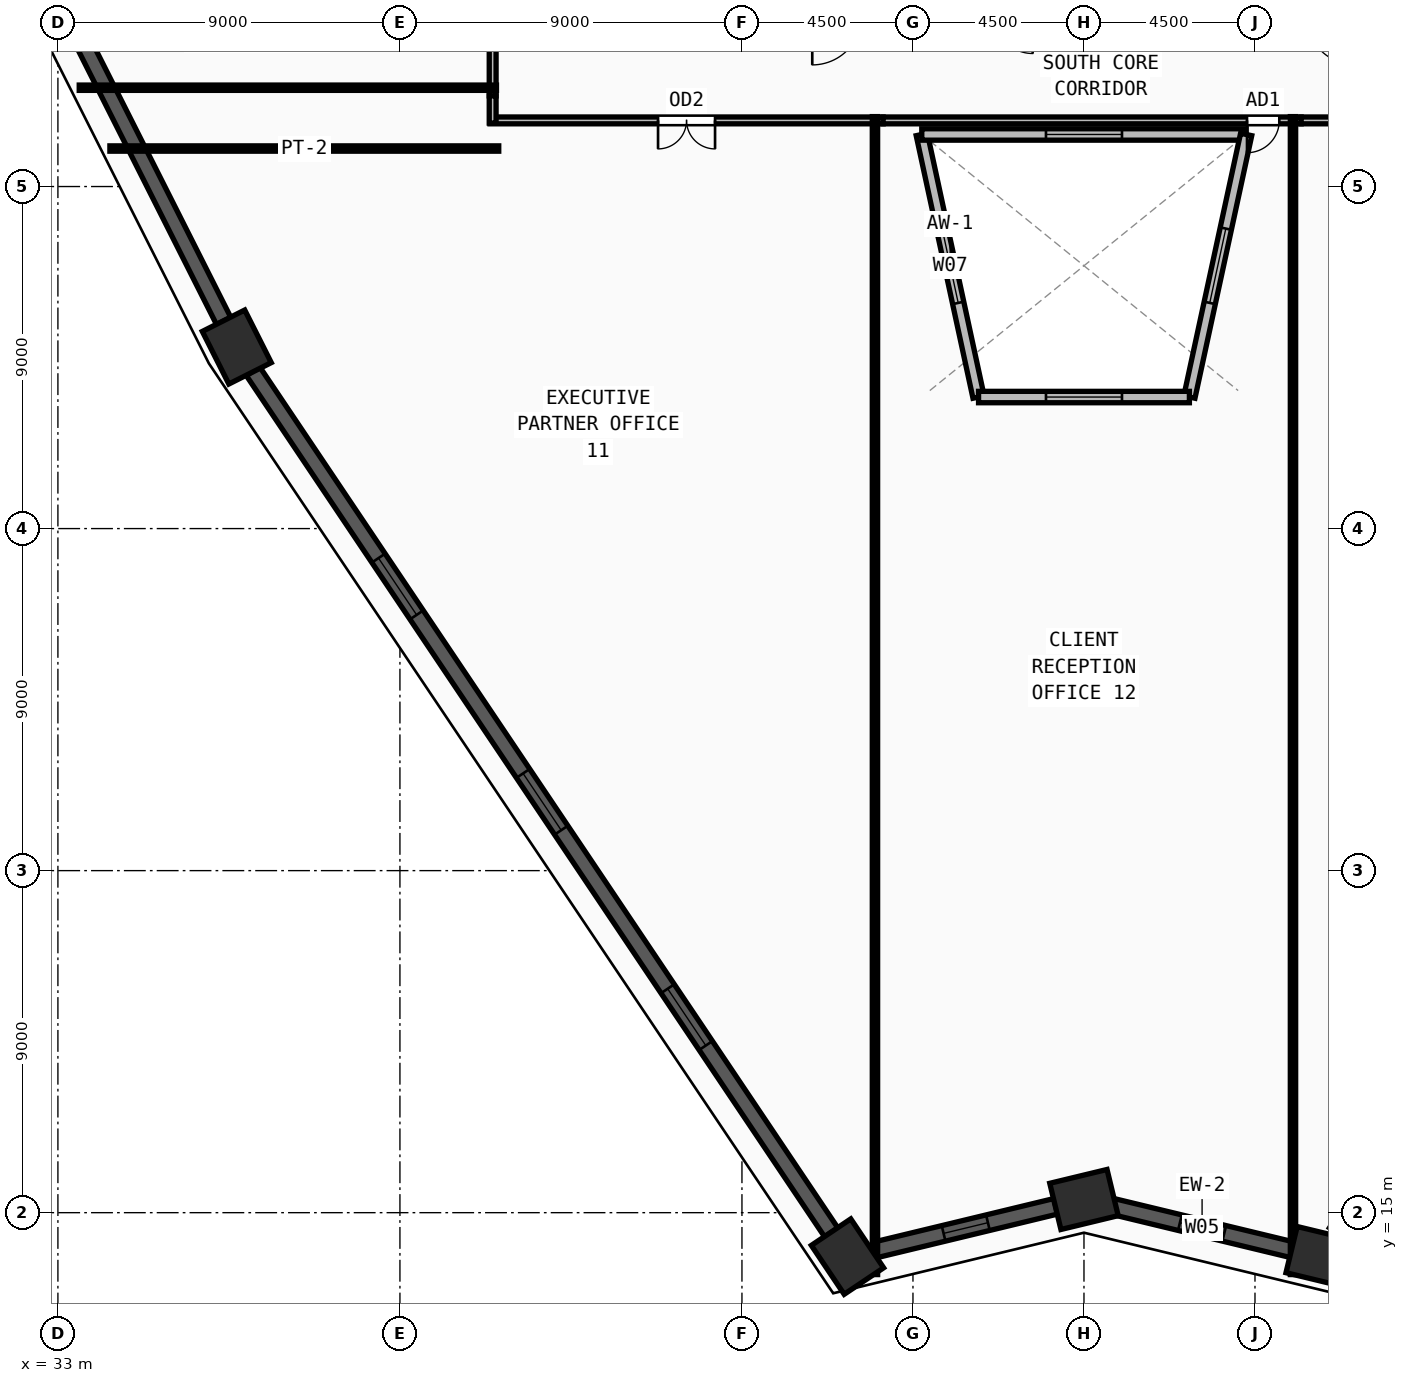
"""IFC4 building model, lengths in metres.
Left out: names, types, materials, properties, quantities, classifications, styles, units other than length and angle.
Written with IfcOpenShell. Run it as: python <this file> out.ifc"""

import sys

from ifc_helpers import new_model, si_unit, direction, frame, frame_2d, origin, origin_2d, place, context, subcontext, project, spatial, rectangle, extrude, source, transform, mapped, element, fill, save


model = new_model("IFC4")
c1 = context("Model", 3, precision=1e-05, world=origin(), true_north=direction((0.0, 1.0)))
c2 = subcontext(c1, "Body", "Model", "MODEL_VIEW")
j1 = project(units=[si_unit("LENGTHUNIT", "METRE"), si_unit("PLANEANGLEUNIT", "RADIAN")], contexts=[c1])
p1 = place(None, origin())
s1 = spatial("IfcSite", under=j1, at=p1, CompositionType="ELEMENT")
p2 = place(p1, origin())
s2 = spatial("IfcBuilding", under=s1, at=p2, CompositionType="ELEMENT")
p3 = place(p2, frame((0.0, 0.0, 74.25)))
s3 = spatial("IfcBuildingStorey", under=s2, at=p3, CompositionType="ELEMENT", Elevation=74.25)
m1 = source(origin(), c2, "Body", "SweptSolid", [
    extrude(rectangle(XDim=1.55, YDim=1.25, at=origin_2d()), origin(), (0.0, 0.0, 1.0), 3.75),
])
for number, where, z_axis, x_axis in (
    (1, (53.777, 13.844, 0.0), (0.0, 0.0, 1.0), (-0.557, 0.83, 0.0)),
    (2, (37.707, 37.777, 0.0), (0.0, 0.0, 1.0), (-0.45, 0.893, 0.0)),
    (3, (66.216, 13.846, 0.0), (0.0, 0.0, 1.0), (-0.972, 0.235, 0.0)),
    (4, (60.0, 15.347, 0.0), (0.0, 0.0, 1.0), (0.972, 0.235, 0.0)),
):
    element("IfcColumn", number, at=place(p3, frame(where, z_axis=z_axis, x_axis=x_axis)), inside=s3, PredefinedType="COLUMN", context=c2, shape_type="MappedRepresentation", body=[
        mapped(m1, transform((0.0, 0.0, 0.0), x_axis=(1.0, 0.0, 0.0), y_axis=(0.0, 1.0, 0.0), z_axis=(0.0, 0.0, 1.0), scale=1.0)),
    ])
p4 = place(p3, frame((60.744, 15.167, 0.0), z_axis=(0.0, 0.0, 1.0), x_axis=(0.972088524974, -0.234614363613, 0.0)))
e5 = element("IfcWall", 5, at=p4, inside=s3, PredefinedType="SOLIDWALL", context=c2, shape_type="SweptSolid", body=[
    extrude(rectangle(XDim=4.864, YDim=0.42, at=frame_2d((2.432, 0.0))), origin(), (0.0, 0.0, 1.0), 3.57),
])
m2 = source(origin(), c2, "Body", "SweptSolid", [
    extrude(rectangle(XDim=1.2, YDim=1.9, at=frame_2d((0.6, 0.95))), frame((0.0, 0.22, 0.0), z_axis=(0.0, -1.0, 0.0), x_axis=(1.0, 0.0, 0.0)), (0.0, 0.0, 1.0), 0.44),
])
p5 = place(p4, frame((1.832, 0.0, 0.55)))
e6 = element("IfcOpeningElement", 6, at=p5, cuts=e5, PredefinedType="OPENING", context=c2, shape_type="MappedRepresentation", body=[
    mapped(m2, transform((0.0, 0.0, 0.0), x_axis=(1.0, 0.0, 0.0), y_axis=(0.0, 1.0, 0.0), z_axis=(0.0, 0.0, 1.0), scale=1.0)),
])
p6 = place(p3, frame((22.462, 68.01, 0.0), z_axis=(0.0, 0.0, 1.0), x_axis=(0.450259201953, -0.89289789509, 0.0)))
e7 = element("IfcWall", 7, at=p6, inside=s3, PredefinedType="SOLIDWALL", context=c2, shape_type="SweptSolid", body=[
    extrude(rectangle(XDim=33.094, YDim=0.42, at=frame_2d((16.547, 0.0))), origin(), (0.0, 0.0, 1.0), 3.57),
])
m3 = source(origin(), c2, "Body", "SweptSolid", [
    extrude(rectangle(XDim=1.8, YDim=1.95, at=frame_2d((0.9, 0.975))), frame((0.0, 0.22, 0.0), z_axis=(0.0, -1.0, 0.0), x_axis=(1.0, 0.0, 0.0)), (0.0, 0.0, 1.0), 0.44),
])
p7 = place(p6, frame((7.374, 0.0, 0.55)))
e8 = element("IfcOpeningElement", 8, at=p7, cuts=e7, PredefinedType="OPENING", context=c2, shape_type="MappedRepresentation", body=[
    mapped(m3, transform((0.0, 0.0, 0.0), x_axis=(1.0, 0.0, 0.0), y_axis=(0.0, 1.0, 0.0), z_axis=(0.0, 0.0, 1.0), scale=1.0)),
])
p8 = place(p6, frame((17.197, 0.0, 0.55)))
e9 = element("IfcOpeningElement", 9, at=p8, cuts=e7, PredefinedType="OPENING", context=c2, shape_type="MappedRepresentation", body=[
    mapped(m3, transform((0.0, 0.0, 0.0), x_axis=(1.0, 0.0, 0.0), y_axis=(0.0, 1.0, 0.0), z_axis=(0.0, 0.0, 1.0), scale=1.0)),
])
p9 = place(p6, frame((23.071, 0.0, 0.55)))
e10 = element("IfcOpeningElement", 10, at=p9, cuts=e7, PredefinedType="OPENING", context=c2, shape_type="MappedRepresentation", body=[
    mapped(m3, transform((0.0, 0.0, 0.0), x_axis=(1.0, 0.0, 0.0), y_axis=(0.0, 1.0, 0.0), z_axis=(0.0, 0.0, 1.0), scale=1.0)),
])
p10 = place(p3, frame((38.133, 37.142, 0.0), z_axis=(0.0, 0.0, 1.0), x_axis=(0.557468884112, -0.830197833801, 0.0)))
e11 = element("IfcWall", 11, at=p10, inside=s3, PredefinedType="SOLIDWALL", context=c2, shape_type="SweptSolid", body=[
    extrude(rectangle(XDim=27.298, YDim=0.42, at=frame_2d((13.649, 0.0))), origin(), (0.0, 0.0, 1.0), 3.57),
])
p11 = place(p10, frame((5.925, 0.0, 0.55)))
e12 = element("IfcOpeningElement", 12, at=p11, cuts=e11, PredefinedType="OPENING", context=c2, shape_type="MappedRepresentation", body=[
    mapped(m3, transform((0.0, 0.0, 0.0), x_axis=(1.0, 0.0, 0.0), y_axis=(0.0, 1.0, 0.0), z_axis=(0.0, 0.0, 1.0), scale=1.0)),
])
p12 = place(p10, frame((12.749, 0.0, 0.55)))
e13 = element("IfcOpeningElement", 13, at=p12, cuts=e11, PredefinedType="OPENING", context=c2, shape_type="MappedRepresentation", body=[
    mapped(m3, transform((0.0, 0.0, 0.0), x_axis=(1.0, 0.0, 0.0), y_axis=(0.0, 1.0, 0.0), z_axis=(0.0, 0.0, 1.0), scale=1.0)),
])
p13 = place(p10, frame((19.574, 0.0, 0.55)))
e14 = element("IfcOpeningElement", 14, at=p13, cuts=e11, PredefinedType="OPENING", context=c2, shape_type="MappedRepresentation", body=[
    mapped(m3, transform((0.0, 0.0, 0.0), x_axis=(1.0, 0.0, 0.0), y_axis=(0.0, 1.0, 0.0), z_axis=(0.0, 0.0, 1.0), scale=1.0)),
])
p14 = place(p3, frame((54.521, 14.024, 0.0), z_axis=(0.0, 0.0, 1.0), x_axis=(0.972077083714, 0.234661763648, 0.0)))
e15 = element("IfcWall", 15, at=p14, inside=s3, PredefinedType="SOLIDWALL", context=c2, shape_type="SweptSolid", body=[
    extrude(rectangle(XDim=4.871, YDim=0.42, at=frame_2d((2.436, 0.0))), origin(), (0.0, 0.0, 1.0), 3.57),
])
p15 = place(p14, frame((1.836, 0.0, 0.55)))
e16 = element("IfcOpeningElement", 16, at=p15, cuts=e15, PredefinedType="OPENING", context=c2, shape_type="MappedRepresentation", body=[
    mapped(m2, transform((0.0, 0.0, 0.0), x_axis=(1.0, 0.0, 0.0), y_axis=(0.0, 1.0, 0.0), z_axis=(0.0, 0.0, 1.0), scale=1.0)),
])
p16 = place(p3, frame((57.226, 36.461, 0.0), z_axis=(0.0, 0.0, 1.0), x_axis=(-0.211368462484, 0.977406452336, 0.0)))
e17 = element("IfcWall", 17, at=p16, inside=s3, PredefinedType="SOLIDWALL", context=c2, shape_type="SweptSolid", body=[
    extrude(rectangle(XDim=7.069, YDim=0.3, at=frame_2d((3.534, 0.0))), origin(), (0.0, 0.0, 1.0), 3.57),
])
m4 = source(origin(), c2, "Body", "SweptSolid", [
    extrude(rectangle(XDim=2.0, YDim=1.9, at=frame_2d((1.0, 0.95))), frame((0.0, 0.16, 0.0), z_axis=(0.0, -1.0, 0.0), x_axis=(1.0, 0.0, 0.0)), (0.0, 0.0, 1.0), 0.32),
])
p17 = place(p16, frame((2.534, 0.0, 0.55)))
e18 = element("IfcOpeningElement", 18, at=p17, cuts=e17, PredefinedType="OPENING", context=c2, shape_type="MappedRepresentation", body=[
    mapped(m4, transform((0.0, 0.0, 0.0), x_axis=(1.0, 0.0, 0.0), y_axis=(0.0, 1.0, 0.0), z_axis=(0.0, 0.0, 1.0), scale=1.0)),
])
p18 = place(p3, frame((55.732, 43.37, 0.0), z_axis=(0.0, 0.0, 1.0), x_axis=(1.0, 0.0, 0.0)))
e19 = element("IfcWall", 19, at=p18, inside=s3, PredefinedType="SOLIDWALL", context=c2, shape_type="SweptSolid", body=[
    extrude(rectangle(XDim=8.536, YDim=0.3, at=frame_2d((4.268, 0.0))), origin(), (0.0, 0.0, 1.0), 3.57),
])
p19 = place(p18, frame((3.268, 0.0, 0.55)))
e20 = element("IfcOpeningElement", 20, at=p19, cuts=e19, PredefinedType="OPENING", context=c2, shape_type="MappedRepresentation", body=[
    mapped(m4, transform((0.0, 0.0, 0.0), x_axis=(1.0, 0.0, 0.0), y_axis=(0.0, 1.0, 0.0), z_axis=(0.0, 0.0, 1.0), scale=1.0)),
])
p20 = place(p3, frame((64.268, 43.37, 0.0), z_axis=(0.0, 0.0, 1.0), x_axis=(-0.211368462484, -0.977406452336, 0.0)))
e21 = element("IfcWall", 21, at=p20, inside=s3, PredefinedType="SOLIDWALL", context=c2, shape_type="SweptSolid", body=[
    extrude(rectangle(XDim=7.069, YDim=0.3, at=frame_2d((3.534, 0.0))), origin(), (0.0, 0.0, 1.0), 3.57),
])
p21 = place(p20, frame((2.534, 0.0, 0.55)))
e22 = element("IfcOpeningElement", 22, at=p21, cuts=e21, PredefinedType="OPENING", context=c2, shape_type="MappedRepresentation", body=[
    mapped(m4, transform((0.0, 0.0, 0.0), x_axis=(1.0, 0.0, 0.0), y_axis=(0.0, 1.0, 0.0), z_axis=(0.0, 0.0, 1.0), scale=1.0)),
])
p22 = place(p3, frame((62.774, 36.461, 0.0), z_axis=(0.0, 0.0, 1.0), x_axis=(-1.0, 0.0, 0.0)))
e23 = element("IfcWall", 23, at=p22, inside=s3, PredefinedType="SOLIDWALL", context=c2, shape_type="SweptSolid", body=[
    extrude(rectangle(XDim=5.548, YDim=0.3, at=frame_2d((2.774, 0.0))), origin(), (0.0, 0.0, 1.0), 3.57),
])
p23 = place(p22, frame((1.774, 0.0, 0.55)))
e24 = element("IfcOpeningElement", 24, at=p23, cuts=e23, PredefinedType="OPENING", context=c2, shape_type="MappedRepresentation", body=[
    mapped(m4, transform((0.0, 0.0, 0.0), x_axis=(1.0, 0.0, 0.0), y_axis=(0.0, 1.0, 0.0), z_axis=(0.0, 0.0, 1.0), scale=1.0)),
])
p24 = place(p3, frame((44.44, 44.385, 0.0), z_axis=(0.0, 0.0, 1.0), x_axis=(0.0, 1.0, 0.0)))
e25 = element("IfcWall", 25, at=p24, inside=s3, PredefinedType="PARTITIONING", context=c2, shape_type="SweptSolid", body=[
    extrude(rectangle(XDim=3.9, YDim=0.18, at=frame_2d((1.95, 0.0))), origin(), (0.0, 0.0, 1.0), 3.57),
])
m5 = source(origin(), c2, "Body", "SweptSolid", [
    extrude(rectangle(XDim=1.0, YDim=2.2, at=frame_2d((0.5, 1.1))), frame((0.0, 0.1, 0.0), z_axis=(0.0, -1.0, 0.0), x_axis=(1.0, 0.0, 0.0)), (0.0, 0.0, 1.0), 0.2),
])
p25 = place(p24, frame((1.45, 0.0, 0.0)))
e26 = element("IfcOpeningElement", 26, at=p25, cuts=e25, PredefinedType="OPENING", context=c2, shape_type="MappedRepresentation", body=[
    mapped(m5, transform((0.0, 0.0, 0.0), x_axis=(1.0, 0.0, 0.0), y_axis=(0.0, 1.0, 0.0), z_axis=(0.0, 0.0, 1.0), scale=1.0)),
])
p26 = place(p3, frame((54.715, 43.74, 0.0), z_axis=(0.0, 0.0, 1.0), x_axis=(-1.0, 0.0, 0.0)))
e27 = element("IfcWall", 27, at=p26, inside=s3, PredefinedType="PARTITIONING", context=c2, shape_type="SweptSolid", body=[
    extrude(rectangle(XDim=10.345, YDim=0.18, at=frame_2d((5.172, 0.0))), origin(), (0.0, 0.0, 1.0), 3.57),
])
m6 = source(origin(), c2, "Body", "SweptSolid", [
    extrude(rectangle(XDim=1.5, YDim=2.2, at=frame_2d((0.75, 1.1))), frame((0.0, 0.1, 0.0), z_axis=(0.0, -1.0, 0.0), x_axis=(1.0, 0.0, 0.0)), (0.0, 0.0, 1.0), 0.2),
])
p27 = place(p26, frame((4.423, 0.0, 0.0)))
e28 = element("IfcOpeningElement", 28, at=p27, cuts=e27, PredefinedType="OPENING", context=c2, shape_type="MappedRepresentation", body=[
    mapped(m6, transform((0.0, 0.0, 0.0), x_axis=(1.0, 0.0, 0.0), y_axis=(0.0, 1.0, 0.0), z_axis=(0.0, 0.0, 1.0), scale=1.0)),
])
p28 = place(p3, frame((65.715, 43.74, 0.0), z_axis=(0.0, 0.0, 1.0), x_axis=(-1.0, 0.0, 0.0)))
e29 = element("IfcWall", 29, at=p28, inside=s3, PredefinedType="PARTITIONING", context=c2, shape_type="SweptSolid", body=[
    extrude(rectangle(XDim=11.0, YDim=0.18, at=frame_2d((5.5, 0.0))), origin(), (0.0, 0.0, 1.0), 3.57),
])
m7 = source(origin(), c2, "Body", "SweptSolid", [
    extrude(rectangle(XDim=0.85, YDim=2.1, at=frame_2d((0.425, 1.05))), frame((0.0, 0.1, 0.0), z_axis=(0.0, -1.0, 0.0), x_axis=(1.0, 0.0, 0.0)), (0.0, 0.0, 1.0), 0.2),
])
p29 = place(p28, frame((0.575, 0.0, 0.0)))
e30 = element("IfcOpeningElement", 30, at=p29, cuts=e29, PredefinedType="OPENING", context=c2, shape_type="MappedRepresentation", body=[
    mapped(m7, transform((0.0, 0.0, 0.0), x_axis=(1.0, 0.0, 0.0), y_axis=(0.0, 1.0, 0.0), z_axis=(0.0, 0.0, 1.0), scale=1.0)),
])
p30 = place(p3, frame((75.63, 43.74, 0.0), z_axis=(0.0, 0.0, 1.0), x_axis=(-1.0, 0.0, 0.0)))
e31 = element("IfcWall", 31, at=p30, inside=s3, PredefinedType="PARTITIONING", context=c2, shape_type="SweptSolid", body=[
    extrude(rectangle(XDim=9.915, YDim=0.18, at=frame_2d((4.958, 0.0))), origin(), (0.0, 0.0, 1.0), 3.57),
])
p31 = place(p30, frame((4.207, 0.0, 0.0)))
e32 = element("IfcOpeningElement", 32, at=p31, cuts=e31, PredefinedType="OPENING", context=c2, shape_type="MappedRepresentation", body=[
    mapped(m6, transform((0.0, 0.0, 0.0), x_axis=(1.0, 0.0, 0.0), y_axis=(0.0, 1.0, 0.0), z_axis=(0.0, 0.0, 1.0), scale=1.0)),
])
p32 = place(p3, frame((44.44, 43.67, 0.0), z_axis=(0.0, 0.0, 1.0), x_axis=(0.0, 1.0, 0.0)))
e33 = element("IfcWall", 33, at=p32, inside=s3, PredefinedType="PARTITIONING", context=c2, shape_type="SweptSolid", body=[
    extrude(rectangle(XDim=0.715, YDim=0.18, at=frame_2d((0.357, 0.0))), origin(), (0.0, 0.0, 1.0), 3.57),
])
p33 = place(p3, frame((44.6, 43.0, 0.0), z_axis=(0.0, 0.0, 1.0), x_axis=(-1.0, 0.0, 0.0)))
e34 = element("IfcWall", 34, at=p33, inside=s3, PredefinedType="PARTITIONING", context=c2, shape_type="SweptSolid", body=[
    extrude(rectangle(XDim=10.232, YDim=0.14, at=frame_2d((5.116, 0.0))), origin(), (0.0, 0.0, 1.0), 3.57),
])
p34 = place(p3, frame((44.54, 44.6, 0.0), z_axis=(0.0, 0.0, 1.0), x_axis=(-1.0, 0.0, 0.0)))
e35 = element("IfcWall", 35, at=p34, inside=s3, PredefinedType="PARTITIONING", context=c2, shape_type="SweptSolid", body=[
    extrude(rectangle(XDim=10.979, YDim=0.14, at=frame_2d((5.49, 0.0))), origin(), (0.0, 0.0, 1.0), 3.57),
])
for number, where, z_axis, x_axis in (
    (36, (54.5, 43.84, 0.0), (0.0, 0.0, 1.0), (0.0, -1.0, 0.0)),
    (37, (65.5, 43.84, 0.0), (0.0, 0.0, 1.0), (0.0, -1.0, 0.0)),
):
    element("IfcWall", number, at=place(p3, frame(where, z_axis=z_axis, x_axis=x_axis)), inside=s3, PredefinedType="PARTITIONING", context=c2, shape_type="SweptSolid", body=[
        extrude(rectangle(XDim=30.469, YDim=0.14, at=frame_2d((15.234, 0.0))), origin(), (0.0, 0.0, 1.0), 3.57),
    ])
m8 = source(origin(), c2, "Body", "SweptSolid", [
    extrude(rectangle(XDim=1.2, YDim=1.9, at=frame_2d((0.6, 0.95))), frame((0.0, 0.03, 0.0), z_axis=(0.0, -1.0, 0.0), x_axis=(1.0, 0.0, 0.0)), (0.0, 0.0, 1.0), 0.06),
])
p35 = place(p5, origin())
e38 = element("IfcWindow", 38, at=p35, inside=s3, PartitioningType="SINGLE_PANEL", PredefinedType="WINDOW", context=c2, shape_type="MappedRepresentation", body=[
    mapped(m8, transform((0.0, 0.0, 0.0), x_axis=(1.0, 0.0, 0.0), y_axis=(0.0, 1.0, 0.0), z_axis=(0.0, 0.0, 1.0), scale=1.0)),
])
fill(e6, e38)
m9 = source(origin(), c2, "Body", "SweptSolid", [
    extrude(rectangle(XDim=1.8, YDim=1.95, at=frame_2d((0.9, 0.975))), frame((0.0, 0.03, 0.0), z_axis=(0.0, -1.0, 0.0), x_axis=(1.0, 0.0, 0.0)), (0.0, 0.0, 1.0), 0.06),
])
p36 = place(p11, origin())
e39 = element("IfcWindow", 39, at=p36, inside=s3, PartitioningType="DOUBLE_PANEL_VERTICAL", PredefinedType="WINDOW", context=c2, shape_type="MappedRepresentation", body=[
    mapped(m9, transform((0.0, 0.0, 0.0), x_axis=(1.0, 0.0, 0.0), y_axis=(0.0, 1.0, 0.0), z_axis=(0.0, 0.0, 1.0), scale=1.0)),
])
fill(e12, e39)
p37 = place(p12, origin())
e40 = element("IfcWindow", 40, at=p37, inside=s3, PartitioningType="DOUBLE_PANEL_VERTICAL", PredefinedType="WINDOW", context=c2, shape_type="MappedRepresentation", body=[
    mapped(m9, transform((0.0, 0.0, 0.0), x_axis=(1.0, 0.0, 0.0), y_axis=(0.0, 1.0, 0.0), z_axis=(0.0, 0.0, 1.0), scale=1.0)),
])
fill(e13, e40)
p38 = place(p13, origin())
e41 = element("IfcWindow", 41, at=p38, inside=s3, PartitioningType="DOUBLE_PANEL_VERTICAL", PredefinedType="WINDOW", context=c2, shape_type="MappedRepresentation", body=[
    mapped(m9, transform((0.0, 0.0, 0.0), x_axis=(1.0, 0.0, 0.0), y_axis=(0.0, 1.0, 0.0), z_axis=(0.0, 0.0, 1.0), scale=1.0)),
])
fill(e14, e41)
p39 = place(p15, origin())
e42 = element("IfcWindow", 42, at=p39, inside=s3, PartitioningType="SINGLE_PANEL", PredefinedType="WINDOW", context=c2, shape_type="MappedRepresentation", body=[
    mapped(m8, transform((0.0, 0.0, 0.0), x_axis=(1.0, 0.0, 0.0), y_axis=(0.0, 1.0, 0.0), z_axis=(0.0, 0.0, 1.0), scale=1.0)),
])
fill(e16, e42)
m10 = source(origin(), c2, "Body", "SweptSolid", [
    extrude(rectangle(XDim=2.0, YDim=1.9, at=frame_2d((1.0, 0.95))), frame((0.0, 0.03, 0.0), z_axis=(0.0, -1.0, 0.0), x_axis=(1.0, 0.0, 0.0)), (0.0, 0.0, 1.0), 0.06),
])
p40 = place(p17, origin())
e43 = element("IfcWindow", 43, at=p40, inside=s3, PartitioningType="DOUBLE_PANEL_VERTICAL", PredefinedType="WINDOW", context=c2, shape_type="MappedRepresentation", body=[
    mapped(m10, transform((0.0, 0.0, 0.0), x_axis=(1.0, 0.0, 0.0), y_axis=(0.0, 1.0, 0.0), z_axis=(0.0, 0.0, 1.0), scale=1.0)),
])
fill(e18, e43)
p41 = place(p19, origin())
e44 = element("IfcWindow", 44, at=p41, inside=s3, PartitioningType="DOUBLE_PANEL_VERTICAL", PredefinedType="WINDOW", context=c2, shape_type="MappedRepresentation", body=[
    mapped(m10, transform((0.0, 0.0, 0.0), x_axis=(1.0, 0.0, 0.0), y_axis=(0.0, 1.0, 0.0), z_axis=(0.0, 0.0, 1.0), scale=1.0)),
])
fill(e20, e44)
p42 = place(p21, origin())
e45 = element("IfcWindow", 45, at=p42, inside=s3, PartitioningType="DOUBLE_PANEL_VERTICAL", PredefinedType="WINDOW", context=c2, shape_type="MappedRepresentation", body=[
    mapped(m10, transform((0.0, 0.0, 0.0), x_axis=(1.0, 0.0, 0.0), y_axis=(0.0, 1.0, 0.0), z_axis=(0.0, 0.0, 1.0), scale=1.0)),
])
fill(e22, e45)
p43 = place(p23, origin())
e46 = element("IfcWindow", 46, at=p43, inside=s3, PartitioningType="DOUBLE_PANEL_VERTICAL", PredefinedType="WINDOW", context=c2, shape_type="MappedRepresentation", body=[
    mapped(m10, transform((0.0, 0.0, 0.0), x_axis=(1.0, 0.0, 0.0), y_axis=(0.0, 1.0, 0.0), z_axis=(0.0, 0.0, 1.0), scale=1.0)),
])
fill(e24, e46)
m11 = source(origin(), c2, "Body", "SweptSolid", [
    extrude(rectangle(XDim=1.5, YDim=2.2, at=frame_2d((0.75, 1.1))), frame((0.0, 0.025, 0.0), z_axis=(0.0, -1.0, 0.0), x_axis=(1.0, 0.0, 0.0)), (0.0, 0.0, 1.0), 0.05),
])
p44 = place(p27, origin())
e47 = element("IfcDoor", 47, at=p44, inside=s3, OperationType="DOUBLE_DOOR_SINGLE_SWING", PredefinedType="DOOR", context=c2, shape_type="MappedRepresentation", body=[
    mapped(m11, transform((0.0, 0.0, 0.0), x_axis=(1.0, 0.0, 0.0), y_axis=(0.0, 1.0, 0.0), z_axis=(0.0, 0.0, 1.0), scale=1.0)),
])
fill(e28, e47)
m12 = source(origin(), c2, "Body", "SweptSolid", [
    extrude(rectangle(XDim=0.85, YDim=2.1, at=frame_2d((0.425, 1.05))), frame((0.0, 0.025, 0.0), z_axis=(0.0, -1.0, 0.0), x_axis=(1.0, 0.0, 0.0)), (0.0, 0.0, 1.0), 0.05),
])
p45 = place(p29, origin())
e48 = element("IfcDoor", 48, at=p45, inside=s3, OperationType="SINGLE_SWING_RIGHT", PredefinedType="DOOR", context=c2, shape_type="MappedRepresentation", body=[
    mapped(m12, transform((0.0, 0.0, 0.0), x_axis=(1.0, 0.0, 0.0), y_axis=(0.0, 1.0, 0.0), z_axis=(0.0, 0.0, 1.0), scale=1.0)),
])
fill(e30, e48)
save(model, sys.argv[1])
